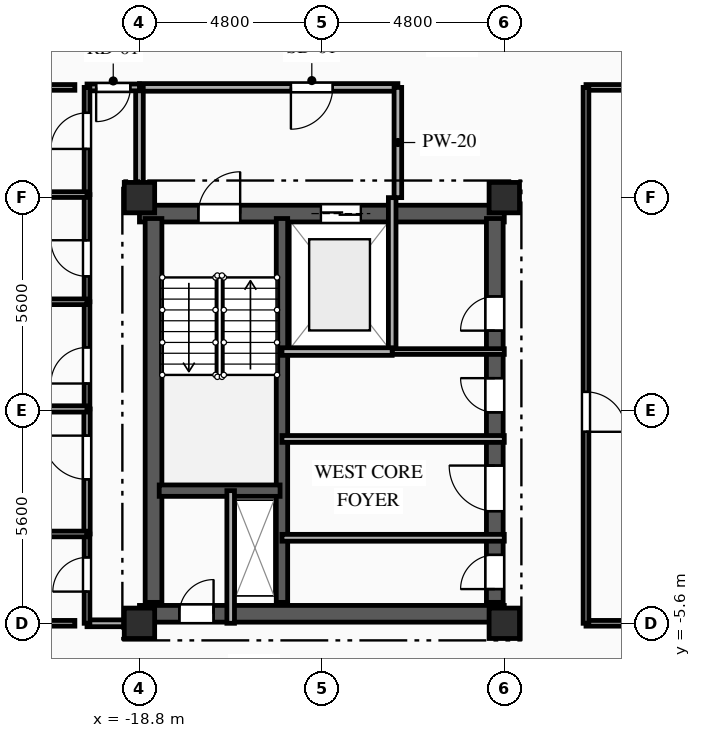
"""IFC4 building model, lengths in metres.
Left out: names, types, materials, properties, quantities, classifications, styles, units other than length and angle.
Written with IfcOpenShell. Run it as: python <this file> out.ifc"""

import sys

from ifc_helpers import new_model, si_unit, direction, frame, frame_2d, origin, origin_2d, place, context, subcontext, project, spatial, rectangle, extrude, element, fill, save


model = new_model("IFC4")
c1 = context("Model", 3, precision=1e-05, world=origin(), true_north=direction((0.0, 1.0)))
c2 = subcontext(c1, "Body", "Model", "MODEL_VIEW")
j1 = project(units=[si_unit("LENGTHUNIT", "METRE"), si_unit("PLANEANGLEUNIT", "RADIAN")], contexts=[c1])
p1 = place(None, origin())
s1 = spatial("IfcSite", under=j1, at=p1, CompositionType="ELEMENT")
p2 = place(p1, origin())
s2 = spatial("IfcBuilding", under=s1, at=p2, CompositionType="ELEMENT")
p3 = place(p2, frame((0.0, 0.0, 245.05)))
s3 = spatial("IfcBuildingStorey", under=s2, at=p3, CompositionType="ELEMENT", Elevation=245.05)
for number, where, z_axis, x_axis in (
    (1, (-18.8, -5.6, 0.0), (0.0, 0.0, 1.0), (1.0, 0.0, 0.0)),
    (2, (-18.8, 5.6, 0.0), (0.0, 0.0, 1.0), (1.0, 0.0, 0.0)),
    (3, (-9.2, -5.6, 0.0), (0.0, 0.0, 1.0), (1.0, 0.0, 0.0)),
    (4, (-9.2, 5.6, 0.0), (0.0, 0.0, 1.0), (1.0, 0.0, 0.0)),
):
    element("IfcColumn", number, at=place(p3, frame(where, z_axis=z_axis, x_axis=x_axis)), inside=s3, PredefinedType="COLUMN", context=c2, shape_type="SweptSolid", body=[
        extrude(rectangle(XDim=0.8, YDim=0.8, at=origin_2d()), origin(), (0.0, 0.0, 1.0), 3.35),
    ])
p4 = place(p3, frame((-18.8, 5.18, 0.0), z_axis=(0.0, 0.0, 1.0), x_axis=(1.0, 0.0, 0.0)))
e5 = element("IfcWall", 5, at=p4, inside=s3, PredefinedType="SHEAR", context=c2, shape_type="SweptSolid", body=[
    extrude(rectangle(XDim=9.6, YDim=0.44, at=frame_2d((4.8, 0.0))), origin(), (0.0, 0.0, 1.0), 3.04),
])
p5 = place(p4, frame((1.55, 0.0, 0.0)))
e6 = element("IfcOpeningElement", 6, at=p5, cuts=e5, PredefinedType="OPENING", context=c2, shape_type="SweptSolid", body=[
    extrude(rectangle(XDim=1.1, YDim=2.15, at=frame_2d((0.55, 1.075))), frame((0.0, 0.23, 0.0), z_axis=(0.0, -1.0, 0.0), x_axis=(1.0, 0.0, 0.0)), (0.0, 0.0, 1.0), 0.46),
])
p6 = place(p4, frame((4.775, 0.0, 0.0)))
e7 = element("IfcOpeningElement", 7, at=p6, cuts=e5, PredefinedType="OPENING", context=c2, shape_type="SweptSolid", body=[
    extrude(rectangle(XDim=1.05, YDim=2.1, at=frame_2d((0.525, 1.05))), frame((0.0, 0.23, 0.0), z_axis=(0.0, -1.0, 0.0), x_axis=(1.0, 0.0, 0.0)), (0.0, 0.0, 1.0), 0.46),
])
p7 = place(p3, frame((-18.8, -5.35, 0.0), z_axis=(0.0, 0.0, 1.0), x_axis=(1.0, 0.0, 0.0)))
e8 = element("IfcWall", 8, at=p7, inside=s3, PredefinedType="SHEAR", context=c2, shape_type="SweptSolid", body=[
    extrude(rectangle(XDim=9.6, YDim=0.44, at=frame_2d((4.8, 0.0))), origin(), (0.0, 0.0, 1.0), 3.04),
])
p8 = place(p7, frame((1.05, 0.0, 0.0)))
e9 = element("IfcOpeningElement", 9, at=p8, cuts=e8, PredefinedType="OPENING", context=c2, shape_type="SweptSolid", body=[
    extrude(rectangle(XDim=0.9, YDim=2.1, at=frame_2d((0.45, 1.05))), frame((0.0, 0.23, 0.0), z_axis=(0.0, -1.0, 0.0), x_axis=(1.0, 0.0, 0.0)), (0.0, 0.0, 1.0), 0.46),
])
p9 = place(p3, frame((-18.43, -5.05, 0.0), z_axis=(0.0, 0.0, 1.0), x_axis=(0.0, 1.0, 0.0)))
e10 = element("IfcWall", 10, at=p9, inside=s3, PredefinedType="SHEAR", context=c2, shape_type="SweptSolid", body=[
    extrude(rectangle(XDim=10.1, YDim=0.44, at=frame_2d((5.05, 0.0))), origin(), (0.0, 0.0, 1.0), 3.04),
])
p10 = place(p3, frame((-9.45, -5.05, 0.0), z_axis=(0.0, 0.0, 1.0), x_axis=(0.0, 1.0, 0.0)))
e11 = element("IfcWall", 11, at=p10, inside=s3, PredefinedType="SHEAR", context=c2, shape_type="SweptSolid", body=[
    extrude(rectangle(XDim=10.1, YDim=0.44, at=frame_2d((5.05, 0.0))), origin(), (0.0, 0.0, 1.0), 3.04),
])
p11 = place(p10, frame((7.15, 0.0, 0.0)))
e12 = element("IfcOpeningElement", 12, at=p11, cuts=e11, PredefinedType="OPENING", context=c2, shape_type="SweptSolid", body=[
    extrude(rectangle(XDim=0.9, YDim=2.1, at=frame_2d((0.45, 1.05))), frame((0.0, 0.23, 0.0), z_axis=(0.0, -1.0, 0.0), x_axis=(1.0, 0.0, 0.0)), (0.0, 0.0, 1.0), 0.46),
])
p12 = place(p10, frame((2.4, 0.0, 0.0)))
e13 = element("IfcOpeningElement", 13, at=p12, cuts=e11, PredefinedType="OPENING", context=c2, shape_type="SweptSolid", body=[
    extrude(rectangle(XDim=1.2, YDim=2.15, at=frame_2d((0.6, 1.075))), frame((0.0, 0.23, 0.0), z_axis=(0.0, -1.0, 0.0), x_axis=(1.0, 0.0, 0.0)), (0.0, 0.0, 1.0), 0.46),
])
p13 = place(p10, frame((0.35, 0.0, 0.0)))
e14 = element("IfcOpeningElement", 14, at=p13, cuts=e11, PredefinedType="OPENING", context=c2, shape_type="SweptSolid", body=[
    extrude(rectangle(XDim=0.9, YDim=2.1, at=frame_2d((0.45, 1.05))), frame((0.0, 0.23, 0.0), z_axis=(0.0, -1.0, 0.0), x_axis=(1.0, 0.0, 0.0)), (0.0, 0.0, 1.0), 0.46),
])
p14 = place(p10, frame((5.0, 0.0, 0.0)))
e15 = element("IfcOpeningElement", 15, at=p14, cuts=e11, PredefinedType="OPENING", context=c2, shape_type="SweptSolid", body=[
    extrude(rectangle(XDim=0.9, YDim=2.1, at=frame_2d((0.45, 1.05))), frame((0.0, 0.23, 0.0), z_axis=(0.0, -1.0, 0.0), x_axis=(1.0, 0.0, 0.0)), (0.0, 0.0, 1.0), 0.46),
])
p15 = place(p3, frame((-15.05, -5.05, 0.0), z_axis=(0.0, 0.0, 1.0), x_axis=(0.0, 1.0, 0.0)))
e16 = element("IfcWall", 16, at=p15, inside=s3, PredefinedType="SHEAR", context=c2, shape_type="SweptSolid", body=[
    extrude(rectangle(XDim=10.1, YDim=0.3, at=frame_2d((5.05, 0.0))), origin(), (0.0, 0.0, 1.0), 3.04),
])
p16 = place(p3, frame((-18.28, -2.11, 0.0), z_axis=(0.0, 0.0, 1.0), x_axis=(1.0, 0.0, 0.0)))
e17 = element("IfcWall", 17, at=p16, inside=s3, PredefinedType="SHEAR", context=c2, shape_type="SweptSolid", body=[
    extrude(rectangle(XDim=3.18, YDim=0.3, at=frame_2d((1.59, 0.0))), origin(), (0.0, 0.0, 1.0), 3.04),
])
p17 = place(p3, frame((-16.4, -5.6, 0.0), z_axis=(0.0, 0.0, 1.0), x_axis=(0.0, 1.0, 0.0)))
e18 = element("IfcWall", 18, at=p17, inside=s3, PredefinedType="PARTITIONING", context=c2, shape_type="SweptSolid", body=[
    extrude(rectangle(XDim=3.49, YDim=0.2, at=frame_2d((1.745, 0.0))), origin(), (0.0, 0.0, 1.0), 3.04),
])
p18 = place(p3, frame((-12.15, 1.55, 0.0), z_axis=(0.0, 0.0, 1.0), x_axis=(0.0, 1.0, 0.0)))
e19 = element("IfcWall", 19, at=p18, inside=s3, PredefinedType="PARTITIONING", context=c2, shape_type="SweptSolid", body=[
    extrude(rectangle(XDim=4.05, YDim=0.2, at=frame_2d((2.025, 0.0))), origin(), (0.0, 0.0, 1.0), 3.04),
])
p19 = place(p3, frame((-12.0, 8.5, 0.0), z_axis=(0.0, 0.0, 1.0), x_axis=(-1.0, 0.0, 0.0)))
e20 = element("IfcWall", 20, at=p19, inside=s3, PredefinedType="PARTITIONING", context=c2, shape_type="SweptSolid", body=[
    extrude(rectangle(XDim=6.8, YDim=0.2, at=frame_2d((3.4, 0.0))), origin(), (0.0, 0.0, 1.0), 3.04),
])
p20 = place(p19, frame((1.715, 0.0, 0.0)))
e21 = element("IfcOpeningElement", 21, at=p20, cuts=e20, PredefinedType="OPENING", context=c2, shape_type="SweptSolid", body=[
    extrude(rectangle(XDim=1.1, YDim=2.15, at=frame_2d((0.55, 1.075))), frame((0.0, 0.11, 0.0), z_axis=(0.0, -1.0, 0.0), x_axis=(1.0, 0.0, 0.0)), (0.0, 0.0, 1.0), 0.22),
])
p21 = place(p3, frame((-12.0, 5.6, 0.0), z_axis=(0.0, 0.0, 1.0), x_axis=(0.0, 1.0, 0.0)))
e22 = element("IfcWall", 22, at=p21, inside=s3, PredefinedType="PARTITIONING", context=c2, shape_type="SweptSolid", body=[
    extrude(rectangle(XDim=2.9, YDim=0.2, at=frame_2d((1.45, 0.0))), origin(), (0.0, 0.0, 1.0), 3.04),
])
p22 = place(p3, frame((-18.8, 8.5, 0.0), z_axis=(0.0, 0.0, 1.0), x_axis=(0.0, -1.0, 0.0)))
e23 = element("IfcWall", 23, at=p22, inside=s3, PredefinedType="PARTITIONING", context=c2, shape_type="SweptSolid", body=[
    extrude(rectangle(XDim=2.9, YDim=0.2, at=frame_2d((1.45, 0.0))), origin(), (0.0, 0.0, 1.0), 2.665),
])
p23 = place(p3, frame((-12.15, 1.55, 0.0), z_axis=(0.0, 0.0, 1.0), x_axis=(1.0, 0.0, 0.0)))
e24 = element("IfcWall", 24, at=p23, inside=s3, PredefinedType="PARTITIONING", context=c2, shape_type="SweptSolid", body=[
    extrude(rectangle(XDim=2.95, YDim=0.15, at=frame_2d((1.475, 0.0))), origin(), (0.0, 0.0, 1.0), 3.04),
])
p24 = place(p3, frame((-15.05, -3.35, 0.0), z_axis=(0.0, 0.0, 1.0), x_axis=(1.0, 0.0, 0.0)))
e25 = element("IfcWall", 25, at=p24, inside=s3, PredefinedType="PARTITIONING", context=c2, shape_type="SweptSolid", body=[
    extrude(rectangle(XDim=5.85, YDim=0.18, at=frame_2d((2.925, 0.0))), origin(), (0.0, 0.0, 1.0), 2.755),
])
p25 = place(p3, frame((-9.2, -0.75, 0.0), z_axis=(0.0, 0.0, 1.0), x_axis=(-1.0, 0.0, 0.0)))
e26 = element("IfcWall", 26, at=p25, inside=s3, PredefinedType="PARTITIONING", context=c2, shape_type="SweptSolid", body=[
    extrude(rectangle(XDim=5.85, YDim=0.18, at=frame_2d((2.925, 0.0))), origin(), (0.0, 0.0, 1.0), 3.04),
])
p26 = place(p3, frame((-18.8, 8.5, 0.0), z_axis=(0.0, 0.0, 1.0), x_axis=(-1.0, 0.0, 0.0)))
e27 = element("IfcWall", 27, at=p26, inside=s3, PredefinedType="PARTITIONING", context=c2, shape_type="SweptSolid", body=[
    extrude(rectangle(XDim=1.38, YDim=0.18, at=frame_2d((0.69, 0.0))), origin(), (0.0, 0.0, 1.0), 3.04),
])
p27 = place(p26, frame((0.24, 0.0, 0.0)))
e28 = element("IfcOpeningElement", 28, at=p27, cuts=e27, PredefinedType="OPENING", context=c2, shape_type="SweptSolid", body=[
    extrude(rectangle(XDim=0.9, YDim=2.1, at=frame_2d((0.45, 1.05))), frame((0.0, 0.1, 0.0), z_axis=(0.0, -1.0, 0.0), x_axis=(1.0, 0.0, 0.0)), (0.0, 0.0, 1.0), 0.2),
])
p28 = place(p3, frame((-20.5, 8.5, 0.0), z_axis=(0.0, 0.0, 1.0), x_axis=(-1.0, 0.0, 0.0)))
e29 = element("IfcWall", 29, at=p28, inside=s3, PredefinedType="PARTITIONING", context=c2, shape_type="SweptSolid", body=[
    extrude(rectangle(XDim=0.7, YDim=0.15, at=frame_2d((0.35, 0.0))), origin(), (0.0, 0.0, 1.0), 3.04),
])
p29 = place(p3, frame((0.0, 8.5, 0.0), z_axis=(0.0, 0.0, 1.0), x_axis=(-1.0, 0.0, 0.0)))
e30 = element("IfcWall", 30, at=p29, inside=s3, PredefinedType="PARTITIONING", context=c2, shape_type="SweptSolid", body=[
    extrude(rectangle(XDim=7.05, YDim=0.15, at=frame_2d((3.525, 0.0))), origin(), (0.0, 0.0, 1.0), 3.04),
])
p30 = place(p3, frame((-20.18, -5.6, 0.0), z_axis=(0.0, 0.0, 1.0), x_axis=(1.0, 0.0, 0.0)))
e31 = element("IfcWall", 31, at=p30, inside=s3, PredefinedType="PARTITIONING", context=c2, shape_type="SweptSolid", body=[
    extrude(rectangle(XDim=1.38, YDim=0.18, at=frame_2d((0.69, 0.0))), origin(), (0.0, 0.0, 1.0), 3.04),
])
p31 = place(p3, frame((-21.2, -5.6, 0.0), z_axis=(0.0, 0.0, 1.0), x_axis=(1.0, 0.0, 0.0)))
e32 = element("IfcWall", 32, at=p31, inside=s3, PredefinedType="PLUMBINGWALL", context=c2, shape_type="SweptSolid", body=[
    extrude(rectangle(XDim=0.7, YDim=0.15, at=frame_2d((0.35, 0.0))), origin(), (0.0, 0.0, 1.0), 3.04),
])
p32 = place(p3, frame((-7.05, -5.6, 0.0), z_axis=(0.0, 0.0, 1.0), x_axis=(1.0, 0.0, 0.0)))
e33 = element("IfcWall", 33, at=p32, inside=s3, PredefinedType="PARTITIONING", context=c2, shape_type="SweptSolid", body=[
    extrude(rectangle(XDim=7.05, YDim=0.15, at=frame_2d((3.525, 0.0))), origin(), (0.0, 0.0, 1.0), 2.525),
])
p33 = place(p3, frame((-7.05, 8.5, 0.0), z_axis=(0.0, 0.0, 1.0), x_axis=(0.0, -1.0, 0.0)))
e34 = element("IfcWall", 34, at=p33, inside=s3, PredefinedType="PARTITIONING", context=c2, shape_type="SweptSolid", body=[
    extrude(rectangle(XDim=14.1, YDim=0.15, at=frame_2d((7.05, 0.0))), origin(), (0.0, 0.0, 1.0), 3.04),
])
p34 = place(p33, frame((8.011, 0.0, 0.0)))
e35 = element("IfcOpeningElement", 35, at=p34, cuts=e34, PredefinedType="OPENING", context=c2, shape_type="SweptSolid", body=[
    extrude(rectangle(XDim=1.05, YDim=2.15, at=frame_2d((0.525, 1.075))), frame((0.0, 0.085, 0.0), z_axis=(0.0, -1.0, 0.0), x_axis=(1.0, 0.0, 0.0)), (0.0, 0.0, 1.0), 0.17),
])
p35 = place(p3, frame((-20.18, -5.6, 0.0), z_axis=(0.0, 0.0, 1.0), x_axis=(0.0, 1.0, 0.0)))
e36 = element("IfcWall", 36, at=p35, inside=s3, PredefinedType="PLUMBINGWALL", context=c2, shape_type="SweptSolid", body=[
    extrude(rectangle(XDim=2.35, YDim=0.15, at=frame_2d((1.175, 0.0))), origin(), (0.0, 0.0, 1.0), 3.04),
])
p36 = place(p35, frame((0.834, 0.0, 0.0)))
e37 = element("IfcOpeningElement", 37, at=p36, cuts=e36, PredefinedType="OPENING", context=c2, shape_type="SweptSolid", body=[
    extrude(rectangle(XDim=0.9, YDim=2.1, at=frame_2d((0.45, 1.05))), frame((0.0, 0.085, 0.0), z_axis=(0.0, -1.0, 0.0), x_axis=(1.0, 0.0, 0.0)), (0.0, 0.0, 1.0), 0.17),
])
p37 = place(p3, frame((-20.18, -3.25, 0.0), z_axis=(0.0, 0.0, 1.0), x_axis=(0.0, 1.0, 0.0)))
e38 = element("IfcWall", 38, at=p37, inside=s3, PredefinedType="PARTITIONING", context=c2, shape_type="SweptSolid", body=[
    extrude(rectangle(XDim=3.29, YDim=0.165, at=frame_2d((1.645, 0.0))), origin(), (0.0, 0.0, 1.0), 3.04),
])
p38 = place(p37, frame((1.438, 0.0, 0.0)))
e39 = element("IfcOpeningElement", 39, at=p38, cuts=e38, PredefinedType="OPENING", context=c2, shape_type="SweptSolid", body=[
    extrude(rectangle(XDim=1.15, YDim=2.15, at=frame_2d((0.575, 1.075))), frame((0.0, 0.093, 0.0), z_axis=(0.0, -1.0, 0.0), x_axis=(1.0, 0.0, 0.0)), (0.0, 0.0, 1.0), 0.185),
])
p39 = place(p3, frame((-20.18, 0.04, 0.0), z_axis=(0.0, 0.0, 1.0), x_axis=(0.0, 1.0, 0.0)))
e40 = element("IfcWall", 40, at=p39, inside=s3, PredefinedType="PARTITIONING", context=c2, shape_type="SweptSolid", body=[
    extrude(rectangle(XDim=2.82, YDim=0.15, at=frame_2d((1.41, 0.0))), origin(), (0.0, 0.0, 1.0), 3.04),
])
p40 = place(p39, frame((0.669, 0.0, 0.0)))
e41 = element("IfcOpeningElement", 41, at=p40, cuts=e40, PredefinedType="OPENING", context=c2, shape_type="SweptSolid", body=[
    extrude(rectangle(XDim=0.95, YDim=2.1, at=frame_2d((0.475, 1.05))), frame((0.0, 0.085, 0.0), z_axis=(0.0, -1.0, 0.0), x_axis=(1.0, 0.0, 0.0)), (0.0, 0.0, 1.0), 0.17),
])
p41 = place(p3, frame((-20.18, 2.86, 0.0), z_axis=(0.0, 0.0, 1.0), x_axis=(0.0, 1.0, 0.0)))
e42 = element("IfcWall", 42, at=p41, inside=s3, PredefinedType="PARTITIONING", context=c2, shape_type="SweptSolid", body=[
    extrude(rectangle(XDim=2.82, YDim=0.15, at=frame_2d((1.41, 0.0))), origin(), (0.0, 0.0, 1.0), 3.04),
])
p42 = place(p41, frame((0.669, 0.0, 0.0)))
e43 = element("IfcOpeningElement", 43, at=p42, cuts=e42, PredefinedType="OPENING", context=c2, shape_type="SweptSolid", body=[
    extrude(rectangle(XDim=0.95, YDim=2.1, at=frame_2d((0.475, 1.05))), frame((0.0, 0.085, 0.0), z_axis=(0.0, -1.0, 0.0), x_axis=(1.0, 0.0, 0.0)), (0.0, 0.0, 1.0), 0.17),
])
p43 = place(p3, frame((-20.18, 5.68, 0.0), z_axis=(0.0, 0.0, 1.0), x_axis=(0.0, 1.0, 0.0)))
e44 = element("IfcWall", 44, at=p43, inside=s3, PredefinedType="PARTITIONING", context=c2, shape_type="SweptSolid", body=[
    extrude(rectangle(XDim=2.82, YDim=0.15, at=frame_2d((1.41, 0.0))), origin(), (0.0, 0.0, 1.0), 3.04),
])
p44 = place(p43, frame((1.201, 0.0, 0.0)))
e45 = element("IfcOpeningElement", 45, at=p44, cuts=e44, PredefinedType="OPENING", context=c2, shape_type="SweptSolid", body=[
    extrude(rectangle(XDim=0.95, YDim=2.1, at=frame_2d((0.475, 1.05))), frame((0.0, 0.085, 0.0), z_axis=(0.0, -1.0, 0.0), x_axis=(1.0, 0.0, 0.0)), (0.0, 0.0, 1.0), 0.17),
])
p45 = place(p3, frame((-24.0, -3.25, 0.0), z_axis=(0.0, 0.0, 1.0), x_axis=(1.0, 0.0, 0.0)))
e46 = element("IfcWall", 46, at=p45, inside=s3, PredefinedType="PLUMBINGWALL", context=c2, shape_type="SweptSolid", body=[
    extrude(rectangle(XDim=3.82, YDim=0.15, at=frame_2d((1.91, 0.0))), origin(), (0.0, 0.0, 1.0), 3.04),
])
p46 = place(p3, frame((-24.0, 0.04, 0.0), z_axis=(0.0, 0.0, 1.0), x_axis=(1.0, 0.0, 0.0)))
e47 = element("IfcWall", 47, at=p46, inside=s3, PredefinedType="PARTITIONING", context=c2, shape_type="SweptSolid", body=[
    extrude(rectangle(XDim=3.82, YDim=0.165, at=frame_2d((1.91, 0.0))), origin(), (0.0, 0.0, 1.0), 3.04),
])
p47 = place(p3, frame((-24.0, 2.86, 0.0), z_axis=(0.0, 0.0, 1.0), x_axis=(1.0, 0.0, 0.0)))
e48 = element("IfcWall", 48, at=p47, inside=s3, PredefinedType="PARTITIONING", context=c2, shape_type="SweptSolid", body=[
    extrude(rectangle(XDim=3.82, YDim=0.15, at=frame_2d((1.91, 0.0))), origin(), (0.0, 0.0, 1.0), 2.665),
])
p48 = place(p3, frame((-24.0, 5.68, 0.0), z_axis=(0.0, 0.0, 1.0), x_axis=(1.0, 0.0, 0.0)))
e49 = element("IfcWall", 49, at=p48, inside=s3, PredefinedType="PARTITIONING", context=c2, shape_type="SweptSolid", body=[
    extrude(rectangle(XDim=3.82, YDim=0.15, at=frame_2d((1.91, 0.0))), origin(), (0.0, 0.0, 1.0), 3.04),
])
p49 = place(p3, frame((-15.05, 1.55, 0.0), z_axis=(0.0, 0.0, 1.0), x_axis=(1.0, 0.0, 0.0)))
e50 = element("IfcWall", 50, at=p49, inside=s3, PredefinedType="PARTITIONING", context=c2, shape_type="SweptSolid", body=[
    extrude(rectangle(XDim=2.9, YDim=0.2, at=frame_2d((1.45, 0.0))), origin(), (0.0, 0.0, 1.0), 3.04),
])
p50 = place(p5, origin())
e51 = element("IfcDoor", 51, at=p50, inside=s3, OperationType="SINGLE_SWING_RIGHT", PredefinedType="DOOR", context=c2, shape_type="SweptSolid", body=[
    extrude(rectangle(XDim=1.1, YDim=2.15, at=frame_2d((0.55, 1.075))), frame((0.0, 0.025, 0.0), z_axis=(0.0, -1.0, 0.0), x_axis=(1.0, 0.0, 0.0)), (0.0, 0.0, 1.0), 0.05),
])
fill(e6, e51)
p51 = place(p6, origin())
e52 = element("IfcDoor", 52, at=p51, inside=s3, OperationType="DOUBLE_DOOR_SLIDING", PredefinedType="DOOR", context=c2, shape_type="SweptSolid", body=[
    extrude(rectangle(XDim=1.05, YDim=2.1, at=frame_2d((0.525, 1.05))), frame((0.0, 0.025, 0.0), z_axis=(0.0, -1.0, 0.0), x_axis=(1.0, 0.0, 0.0)), (0.0, 0.0, 1.0), 0.05),
])
fill(e7, e52)
p52 = place(p8, origin())
e53 = element("IfcDoor", 53, at=p52, inside=s3, OperationType="SINGLE_SWING_RIGHT", PredefinedType="DOOR", context=c2, shape_type="SweptSolid", body=[
    extrude(rectangle(XDim=0.9, YDim=2.1, at=frame_2d((0.45, 1.05))), frame((0.0, 0.025, 0.0), z_axis=(0.0, -1.0, 0.0), x_axis=(1.0, 0.0, 0.0)), (0.0, 0.0, 1.0), 0.05),
])
fill(e9, e53)
p53 = place(p20, origin())
e54 = element("IfcDoor", 54, at=p53, inside=s3, OperationType="SINGLE_SWING_RIGHT", PredefinedType="DOOR", context=c2, shape_type="SweptSolid", body=[
    extrude(rectangle(XDim=1.1, YDim=2.15, at=frame_2d((0.55, 1.075))), frame((0.0, 0.025, 0.0), z_axis=(0.0, -1.0, 0.0), x_axis=(1.0, 0.0, 0.0)), (0.0, 0.0, 1.0), 0.05),
])
fill(e21, e54)
p54 = place(p11, origin())
e55 = element("IfcDoor", 55, at=p54, inside=s3, OperationType="SINGLE_SWING_LEFT", PredefinedType="DOOR", context=c2, shape_type="SweptSolid", body=[
    extrude(rectangle(XDim=0.9, YDim=2.1, at=frame_2d((0.45, 1.05))), frame((0.0, 0.025, 0.0), z_axis=(0.0, -1.0, 0.0), x_axis=(1.0, 0.0, 0.0)), (0.0, 0.0, 1.0), 0.05),
])
fill(e12, e55)
p55 = place(p12, origin())
e56 = element("IfcDoor", 56, at=p55, inside=s3, OperationType="SINGLE_SWING_RIGHT", PredefinedType="DOOR", context=c2, shape_type="SweptSolid", body=[
    extrude(rectangle(XDim=1.2, YDim=2.15, at=frame_2d((0.6, 1.075))), frame((0.0, 0.025, 0.0), z_axis=(0.0, -1.0, 0.0), x_axis=(1.0, 0.0, 0.0)), (0.0, 0.0, 1.0), 0.05),
])
fill(e13, e56)
p56 = place(p13, origin())
e57 = element("IfcDoor", 57, at=p56, inside=s3, OperationType="SINGLE_SWING_LEFT", PredefinedType="DOOR", context=c2, shape_type="SweptSolid", body=[
    extrude(rectangle(XDim=0.9, YDim=2.1, at=frame_2d((0.45, 1.05))), frame((0.0, 0.025, 0.0), z_axis=(0.0, -1.0, 0.0), x_axis=(1.0, 0.0, 0.0)), (0.0, 0.0, 1.0), 0.05),
])
fill(e14, e57)
p57 = place(p14, origin())
e58 = element("IfcDoor", 58, at=p57, inside=s3, OperationType="SINGLE_SWING_RIGHT", PredefinedType="DOOR", context=c2, shape_type="SweptSolid", body=[
    extrude(rectangle(XDim=0.9, YDim=2.1, at=frame_2d((0.45, 1.05))), frame((0.0, 0.025, 0.0), z_axis=(0.0, -1.0, 0.0), x_axis=(1.0, 0.0, 0.0)), (0.0, 0.0, 1.0), 0.05),
])
fill(e15, e58)
p58 = place(p27, origin())
e59 = element("IfcDoor", 59, at=p58, inside=s3, OperationType="SINGLE_SWING_RIGHT", PredefinedType="DOOR", context=c2, shape_type="SweptSolid", body=[
    extrude(rectangle(XDim=0.9, YDim=2.1, at=frame_2d((0.45, 1.05))), frame((0.0, 0.025, 0.0), z_axis=(0.0, -1.0, 0.0), x_axis=(1.0, 0.0, 0.0)), (0.0, 0.0, 1.0), 0.05),
])
fill(e28, e59)
p59 = place(p34, origin())
e60 = element("IfcDoor", 60, at=p59, inside=s3, OperationType="SINGLE_SWING_RIGHT", PredefinedType="DOOR", context=c2, shape_type="SweptSolid", body=[
    extrude(rectangle(XDim=1.05, YDim=2.15, at=frame_2d((0.525, 1.075))), frame((0.0, 0.025, 0.0), z_axis=(0.0, -1.0, 0.0), x_axis=(1.0, 0.0, 0.0)), (0.0, 0.0, 1.0), 0.05),
])
fill(e35, e60)
p60 = place(p36, origin())
e61 = element("IfcDoor", 61, at=p60, inside=s3, OperationType="SINGLE_SWING_LEFT", PredefinedType="DOOR", context=c2, shape_type="SweptSolid", body=[
    extrude(rectangle(XDim=0.9, YDim=2.1, at=frame_2d((0.45, 1.05))), frame((0.0, 0.025, 0.0), z_axis=(0.0, -1.0, 0.0), x_axis=(1.0, 0.0, 0.0)), (0.0, 0.0, 1.0), 0.05),
])
fill(e37, e61)
p61 = place(p38, origin())
e62 = element("IfcDoor", 62, at=p61, inside=s3, OperationType="SINGLE_SWING_RIGHT", PredefinedType="DOOR", context=c2, shape_type="SweptSolid", body=[
    extrude(rectangle(XDim=1.15, YDim=2.15, at=frame_2d((0.575, 1.075))), frame((0.0, 0.025, 0.0), z_axis=(0.0, -1.0, 0.0), x_axis=(1.0, 0.0, 0.0)), (0.0, 0.0, 1.0), 0.05),
])
fill(e39, e62)
p62 = place(p40, origin())
e63 = element("IfcDoor", 63, at=p62, inside=s3, OperationType="SINGLE_SWING_LEFT", PredefinedType="DOOR", context=c2, shape_type="SweptSolid", body=[
    extrude(rectangle(XDim=0.95, YDim=2.1, at=frame_2d((0.475, 1.05))), frame((0.0, 0.025, 0.0), z_axis=(0.0, -1.0, 0.0), x_axis=(1.0, 0.0, 0.0)), (0.0, 0.0, 1.0), 0.05),
])
fill(e41, e63)
p63 = place(p42, origin())
e64 = element("IfcDoor", 64, at=p63, inside=s3, OperationType="SINGLE_SWING_RIGHT", PredefinedType="DOOR", context=c2, shape_type="SweptSolid", body=[
    extrude(rectangle(XDim=0.95, YDim=2.1, at=frame_2d((0.475, 1.05))), frame((0.0, 0.025, 0.0), z_axis=(0.0, -1.0, 0.0), x_axis=(1.0, 0.0, 0.0)), (0.0, 0.0, 1.0), 0.05),
])
fill(e43, e64)
p64 = place(p44, origin())
e65 = element("IfcDoor", 65, at=p64, inside=s3, OperationType="SINGLE_SWING_LEFT", PredefinedType="DOOR", context=c2, shape_type="SweptSolid", body=[
    extrude(rectangle(XDim=0.95, YDim=2.1, at=frame_2d((0.475, 1.05))), frame((0.0, 0.025, 0.0), z_axis=(0.0, -1.0, 0.0), x_axis=(1.0, 0.0, 0.0)), (0.0, 0.0, 1.0), 0.05),
])
fill(e45, e65)
save(model, sys.argv[1])
